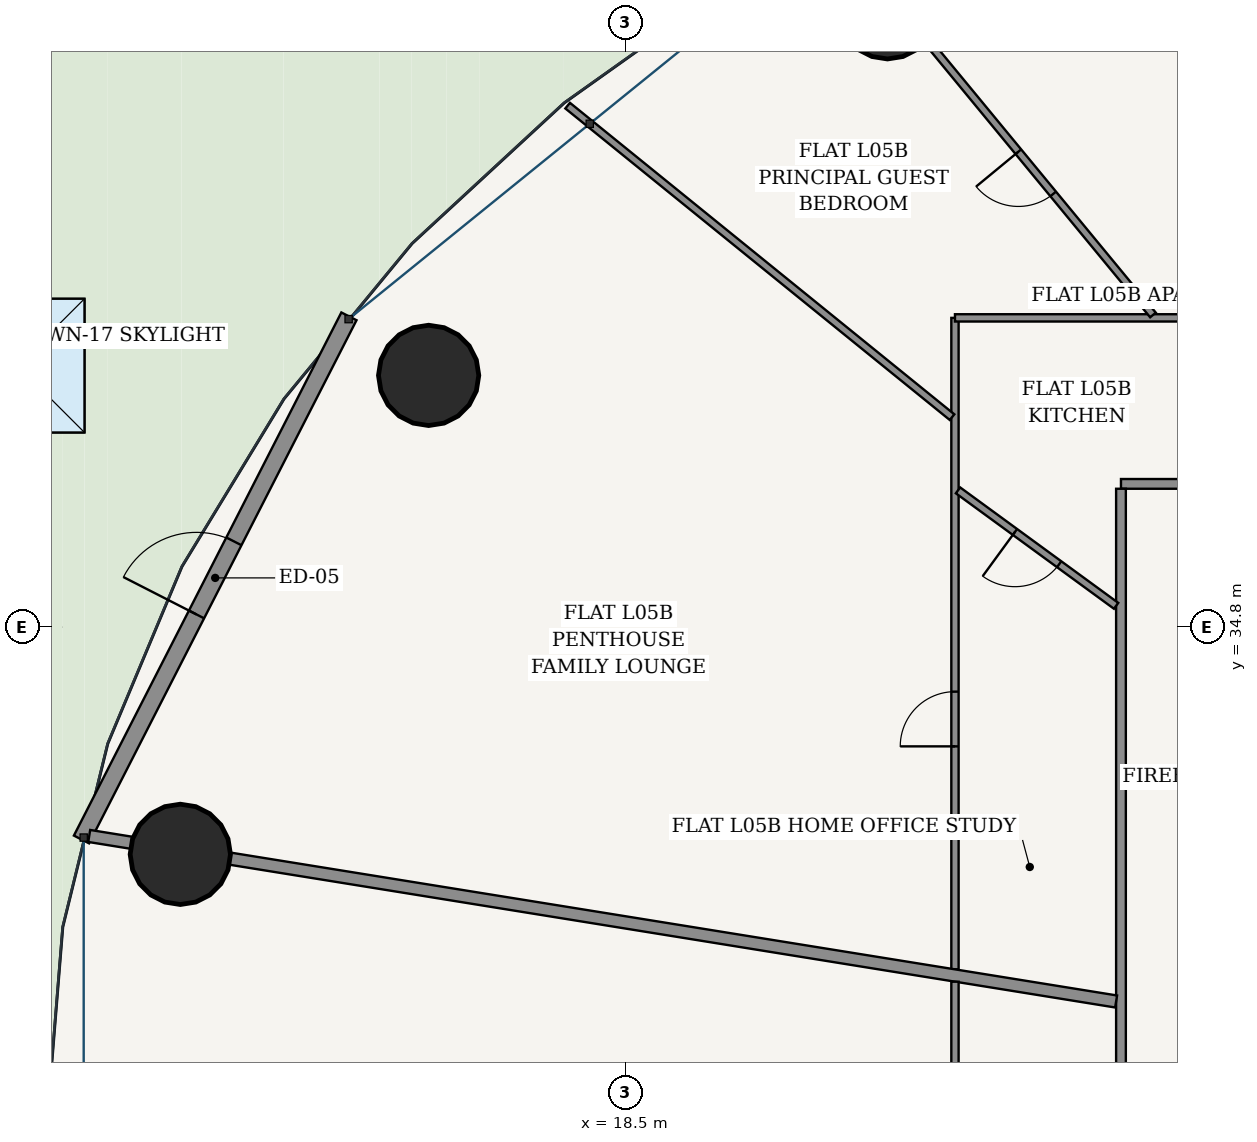
"""IFC4 building model, lengths in metres.
Left out: names, types, materials, properties, quantities, classifications, styles, units other than length and angle.
Written with IfcOpenShell. Run it as: python <this file> out.ifc"""

import sys

from ifc_helpers import new_model, si_unit, direction, frame, frame_2d, origin, origin_2d, place, context, subcontext, project, spatial, rectangle, hollow_circle, extrude, source, transform, mapped, element, fill, save


model = new_model("IFC4")
c1 = context("Model", 3, precision=1e-05, world=origin(), true_north=direction((-0.2419218956, 0.970295726276)))
c2 = subcontext(c1, "Body", "Model", "MODEL_VIEW")
j1 = project(units=[si_unit("LENGTHUNIT", "METRE"), si_unit("PLANEANGLEUNIT", "RADIAN")], contexts=[c1])
p1 = place(None, origin())
s1 = spatial("IfcSite", under=j1, at=p1, CompositionType="ELEMENT")
p2 = place(p1, origin())
s2 = spatial("IfcBuilding", under=s1, at=p2, CompositionType="ELEMENT")
p3 = place(p2, frame((0.0, 0.0, 24.0)))
s3 = spatial("IfcBuildingStorey", under=s2, at=p3, CompositionType="ELEMENT", Elevation=24.0)
for number, where, z_axis, x_axis in (
    (1, (22.805, 44.968, 0.0), (0.0, 0.0, 1.0), (1.0, 0.0, 0.0)),
    (2, (15.259, 38.939, 0.0), (0.0, 0.0, 1.0), (1.0, 0.0, 0.0)),
    (3, (11.176, 31.063, 0.0), (0.0, 0.0, 1.0), (1.0, 0.0, 0.0)),
):
    element("IfcColumn", number, at=place(p3, frame(where, z_axis=z_axis, x_axis=x_axis)), inside=s3, PredefinedType="COLUMN", context=c2, shape_type="SweptSolid", body=[
        extrude(hollow_circle(Radius=0.825, WallThickness=0.05, at=origin_2d()), origin(), (0.0, 0.0, 1.0), 3.6),
    ])
p4 = place(p3, frame((13.949, 39.91, 0.0), z_axis=(0.0, 0.0, 1.0), x_axis=(-0.45523081716, -0.890373462715, 0.0)))
e4 = element("IfcWall", 4, at=p4, inside=s3, PredefinedType="SOLIDWALL", context=c2, shape_type="SweptSolid", body=[
    extrude(rectangle(XDim=9.662, YDim=0.28, at=frame_2d((4.831, 0.0))), origin(), (0.0, 0.0, 1.0), 3.32),
])
p5 = place(p4, frame((4.156, 0.0, 0.0)))
e5 = element("IfcOpeningElement", 5, at=p5, cuts=e4, PredefinedType="OPENING", context=c2, shape_type="SweptSolid", body=[
    extrude(rectangle(XDim=1.35, YDim=2.2, at=frame_2d((0.675, 1.1))), frame((0.0, 0.15, 0.0), z_axis=(0.0, -1.0, 0.0), x_axis=(1.0, 0.0, 0.0)), (0.0, 0.0, 1.0), 0.3),
])
p6 = place(p3, frame((26.645, 37.155, 0.0), z_axis=(0.0, 0.0, 1.0), x_axis=(1.0, 0.0, 0.0)))
e6 = element("IfcWall", 6, at=p6, inside=s3, PredefinedType="PARTITIONING", context=c2, shape_type="SweptSolid", body=[
    extrude(rectangle(XDim=22.71, YDim=0.16, at=frame_2d((11.355, 0.0))), origin(), (0.0, 0.0, 1.0), 2.688),
])
p7 = place(p6, frame((7.446, 0.0, 0.0)))
e7 = element("IfcOpeningElement", 7, at=p7, cuts=e6, PredefinedType="OPENING", context=c2, shape_type="SweptSolid", body=[
    extrude(rectangle(XDim=0.98, YDim=2.2, at=frame_2d((0.49, 1.1))), frame((0.0, 0.09, 0.0), z_axis=(0.0, -1.0, 0.0), x_axis=(1.0, 0.0, 0.0)), (0.0, 0.0, 1.0), 0.18),
])
p8 = place(p3, frame((26.645, 16.525, 0.0), z_axis=(0.0, 0.0, 1.0), x_axis=(0.0, 1.0, 0.0)))
e8 = element("IfcWall", 8, at=p8, inside=s3, PredefinedType="PARTITIONING", context=c2, shape_type="SweptSolid", body=[
    extrude(rectangle(XDim=20.55, YDim=0.16, at=frame_2d((10.275, 0.0))), origin(), (0.0, 0.0, 1.0), 2.688),
])
p9 = place(p3, frame((23.915, 29.172, 0.0), z_axis=(0.0, 0.0, 1.0), x_axis=(0.0, 1.0, 0.0)))
e9 = element("IfcWall", 9, at=p9, inside=s3, PredefinedType="PARTITIONING", context=c2, shape_type="SweptSolid", body=[
    extrude(rectangle(XDim=10.713, YDim=0.12, at=frame_2d((5.356, 0.0))), origin(), (0.0, 0.0, 1.0), 2.688),
])
p10 = place(p9, frame((3.666, 0.0, 0.0)))
e10 = element("IfcOpeningElement", 10, at=p10, cuts=e9, PredefinedType="OPENING", context=c2, shape_type="SweptSolid", body=[
    extrude(rectangle(XDim=0.9, YDim=2.15, at=frame_2d((0.45, 1.075))), frame((0.0, 0.07, 0.0), z_axis=(0.0, -1.0, 0.0), x_axis=(1.0, 0.0, 0.0)), (0.0, 0.0, 1.0), 0.14),
])
p11 = place(p3, frame((23.915, 39.885, 0.0), z_axis=(0.0, 0.0, 1.0), x_axis=(1.0, 0.0, 0.0)))
e11 = element("IfcWall", 11, at=p11, inside=s3, PredefinedType="PARTITIONING", context=c2, shape_type="SweptSolid", body=[
    extrude(rectangle(XDim=20.671, YDim=0.12, at=frame_2d((10.336, 0.0))), origin(), (0.0, 0.0, 1.0), 2.688),
])
p12 = place(p11, frame((10.444, 0.0, 0.0)))
e12 = element("IfcOpeningElement", 12, at=p12, cuts=e11, PredefinedType="OPENING", context=c2, shape_type="SweptSolid", body=[
    extrude(rectangle(XDim=0.9, YDim=2.15, at=frame_2d((0.45, 1.075))), frame((0.0, 0.07, 0.0), z_axis=(0.0, -1.0, 0.0), x_axis=(1.0, 0.0, 0.0)), (0.0, 0.0, 1.0), 0.14),
])
p13 = place(p3, frame((31.283, 39.94, 0.0), z_axis=(0.0, 0.0, 1.0), x_axis=(-0.455131303234, 0.890424335256, 0.0)))
e13 = element("IfcWall", 13, at=p13, inside=s3, PredefinedType="PARTITIONING", context=c2, shape_type="SweptSolid", body=[
    extrude(rectangle(XDim=9.562, YDim=0.12, at=frame_2d((4.781, 0.0))), origin(), (0.0, 0.0, 1.0), 2.762),
])
p14 = place(p13, frame((4.331, 0.0, 0.0)))
e14 = element("IfcOpeningElement", 14, at=p14, cuts=e13, PredefinedType="OPENING", context=c2, shape_type="SweptSolid", body=[
    extrude(rectangle(XDim=0.9, YDim=2.15, at=frame_2d((0.45, 1.075))), frame((0.0, 0.07, 0.0), z_axis=(0.0, -1.0, 0.0), x_axis=(1.0, 0.0, 0.0)), (0.0, 0.0, 1.0), 0.14),
])
p15 = place(p3, frame((27.171, 39.933, 0.0), z_axis=(0.0, 0.0, 1.0), x_axis=(-0.636192172227, 0.771530634516, 0.0)))
e15 = element("IfcWall", 15, at=p15, inside=s3, PredefinedType="PARTITIONING", context=c2, shape_type="SweptSolid", body=[
    extrude(rectangle(XDim=8.186, YDim=0.12, at=frame_2d((4.093, 0.0))), origin(), (0.0, 0.0, 1.0), 2.688),
])
p16 = place(p15, frame((2.579, 0.0, 0.0)))
e16 = element("IfcOpeningElement", 16, at=p16, cuts=e15, PredefinedType="OPENING", context=c2, shape_type="SweptSolid", body=[
    extrude(rectangle(XDim=0.9, YDim=2.15, at=frame_2d((0.45, 1.075))), frame((0.0, 0.07, 0.0), z_axis=(0.0, -1.0, 0.0), x_axis=(1.0, 0.0, 0.0)), (0.0, 0.0, 1.0), 0.14),
])
p17 = place(p3, frame((23.867, 38.253, 0.0), z_axis=(0.0, 0.0, 1.0), x_axis=(-0.776936623447, 0.629578814087, 0.0)))
e17 = element("IfcWall", 17, at=p17, inside=s3, PredefinedType="PARTITIONING", context=c2, shape_type="SweptSolid", body=[
    extrude(rectangle(XDim=8.136, YDim=0.12, at=frame_2d((4.068, 0.0))), origin(), (0.0, 0.0, 1.0), 2.762),
])
p18 = place(p3, frame((26.565, 35.15, 0.0), z_axis=(0.0, 0.0, 1.0), x_axis=(-0.807606444557, 0.589721824855, 0.0)))
e18 = element("IfcWall", 18, at=p18, inside=s3, PredefinedType="PARTITIONING", context=c2, shape_type="SweptSolid", body=[
    extrude(rectangle(XDim=3.219, YDim=0.12, at=frame_2d((1.61, 0.0))), origin(), (0.0, 0.0, 1.0), 3.32),
])
p19 = place(p18, frame((1.16, 0.0, 0.0)))
e19 = element("IfcOpeningElement", 19, at=p19, cuts=e18, PredefinedType="OPENING", context=c2, shape_type="SweptSolid", body=[
    extrude(rectangle(XDim=0.9, YDim=2.15, at=frame_2d((0.45, 1.075))), frame((0.0, 0.07, 0.0), z_axis=(0.0, -1.0, 0.0), x_axis=(1.0, 0.0, 0.0)), (0.0, 0.0, 1.0), 0.14),
])
p20 = place(p3, frame((26.565, 28.643, 0.0), z_axis=(0.0, 0.0, 1.0), x_axis=(-0.987255953651, 0.159140447344, 0.0)))
e20 = element("IfcWall", 20, at=p20, inside=s3, PredefinedType="PARTITIONING", context=c2, shape_type="SweptSolid", body=[
    extrude(rectangle(XDim=17.105, YDim=0.2, at=frame_2d((8.553, 0.0))), origin(), (0.0, 0.0, 1.0), 2.688),
])
p21 = place(p3, frame((23.915, 13.715, 0.0), z_axis=(0.0, 0.0, 1.0), x_axis=(0.0, 1.0, 0.0)))
e21 = element("IfcWall", 21, at=p21, inside=s3, PredefinedType="PARTITIONING", context=c2, shape_type="SweptSolid", body=[
    extrude(rectangle(XDim=15.253, YDim=0.12, at=frame_2d((7.626, 0.0))), origin(), (0.0, 0.0, 1.0), 2.688),
])
p22 = place(p21, frame((9.429, 0.0, 0.0)))
e22 = element("IfcOpeningElement", 22, at=p22, cuts=e21, PredefinedType="OPENING", context=c2, shape_type="SweptSolid", body=[
    extrude(rectangle(XDim=0.9, YDim=2.15, at=frame_2d((0.45, 1.075))), frame((0.0, 0.07, 0.0), z_axis=(0.0, -1.0, 0.0), x_axis=(1.0, 0.0, 0.0)), (0.0, 0.0, 1.0), 0.14),
])
p23 = place(p21, frame((12.803, 0.0, 0.0)))
e23 = element("IfcOpeningElement", 23, at=p23, cuts=e21, PredefinedType="OPENING", context=c2, shape_type="SweptSolid", body=[
    extrude(rectangle(XDim=0.9, YDim=2.15, at=frame_2d((0.45, 1.075))), frame((0.0, 0.07, 0.0), z_axis=(0.0, -1.0, 0.0), x_axis=(1.0, 0.0, 0.0)), (0.0, 0.0, 1.0), 0.14),
])
m1 = source(origin(), c2, "Body", "SweptSolid", [
    extrude(rectangle(XDim=1.35, YDim=2.2, at=frame_2d((0.675, 1.1))), frame((0.0, 0.025, 0.0), z_axis=(0.0, -1.0, 0.0), x_axis=(1.0, 0.0, 0.0)), (0.0, 0.0, 1.0), 0.05),
])
p24 = place(p5, frame((1.35, 0.0, 0.0), z_axis=(0.0, 0.0, 1.0), x_axis=(-1.0, 0.0, 0.0)))
e24 = element("IfcDoor", 24, at=p24, inside=s3, OperationType="SINGLE_SWING_LEFT", PredefinedType="DOOR", context=c2, shape_type="MappedRepresentation", body=[
    mapped(m1, transform((0.0, 0.0, 0.0), scale=1.0)),
])
fill(e5, e24)
p25 = place(p3, frame((0.0, 0.0, -0.3)))
p26 = place(p25, frame((8.5, 39.1, 0.0)))
p27 = place(p26, frame((0.0, 0.0, 0.26)))
e25 = element("IfcWindow", 25, at=p27, inside=s3, PartitioningType="SINGLE_PANEL", PredefinedType="SKYLIGHT", context=c2, shape_type="SweptSolid", body=[
    extrude(rectangle(XDim=2.2, YDim=2.2, at=origin_2d()), origin(), (0.0, 0.0, 1.0), 0.04),
])
m2 = source(origin(), c2, "Body", "SweptSolid", [
    extrude(rectangle(XDim=0.9, YDim=2.15, at=frame_2d((0.45, 1.075))), frame((0.0, 0.025, 0.0), z_axis=(0.0, -1.0, 0.0), x_axis=(1.0, 0.0, 0.0)), (0.0, 0.0, 1.0), 0.05),
])
p28 = place(p19, origin())
e26 = element("IfcDoor", 26, at=p28, inside=s3, OperationType="SINGLE_SWING_RIGHT", PredefinedType="DOOR", context=c2, shape_type="MappedRepresentation", body=[
    mapped(m2, transform((0.0, 0.0, 0.0), scale=1.0)),
])
fill(e19, e26)
p29 = place(p16, origin())
e27 = element("IfcDoor", 27, at=p29, inside=s3, OperationType="SINGLE_SWING_RIGHT", PredefinedType="DOOR", context=c2, shape_type="MappedRepresentation", body=[
    mapped(m2, transform((0.0, 0.0, 0.0), scale=1.0)),
])
fill(e16, e27)
p30 = place(p10, origin())
e28 = element("IfcDoor", 28, at=p30, inside=s3, OperationType="SINGLE_SWING_LEFT", PredefinedType="DOOR", context=c2, shape_type="MappedRepresentation", body=[
    mapped(m2, transform((0.0, 0.0, 0.0), scale=1.0)),
])
fill(e10, e28)
save(model, sys.argv[1])
